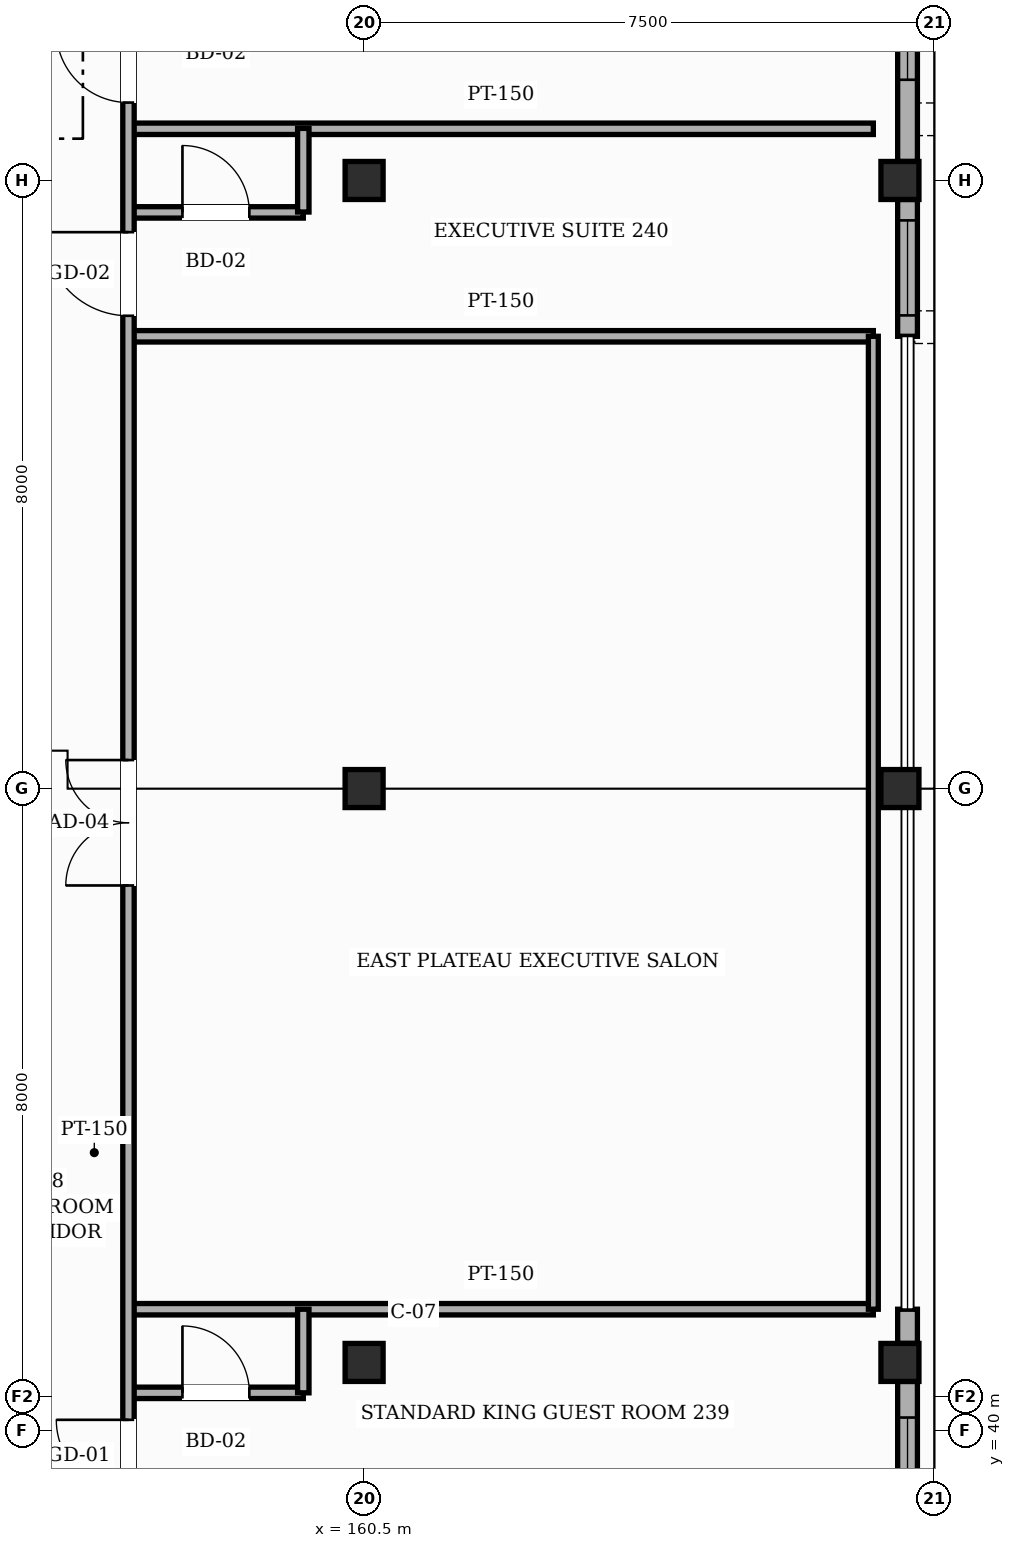
"""IFC4 building model, lengths in metres.
Left out: names, types, materials, properties, quantities, classifications, styles, units other than length and angle.
Written with IfcOpenShell. Run it as: python <this file> out.ifc"""

import sys

from ifc_helpers import new_model, si_unit, direction, frame, frame_2d, origin, origin_2d, place, context, subcontext, project, spatial, rectangle, hollow_rectangle, extrude, element, fill, save


model = new_model("IFC4")
c1 = context("Model", 3, precision=1e-05, world=origin(), true_north=direction((0.0, 1.0)))
c2 = subcontext(c1, "Body", "Model", "MODEL_VIEW")
j1 = project(units=[si_unit("LENGTHUNIT", "METRE"), si_unit("PLANEANGLEUNIT", "RADIAN")], contexts=[c1])
p1 = place(None, origin())
s1 = spatial("IfcSite", under=j1, at=p1, CompositionType="ELEMENT")
p2 = place(p1, origin())
s2 = spatial("IfcBuilding", under=s1, at=p2, CompositionType="ELEMENT")
p3 = place(p2, frame((0.0, 0.0, 35.4)))
s3 = spatial("IfcBuildingStorey", under=s2, at=p3, CompositionType="ELEMENT", Elevation=35.4)
for number, where, z_axis, x_axis in (
    (1, (160.5, 40.9, 0.0), (0.0, 0.0, 1.0), (1.0, 0.0, 0.0)),
    (2, (160.5, 48.45, 0.0), (0.0, 0.0, 1.0), (1.0, 0.0, 0.0)),
    (3, (160.5, 56.45, 0.0), (0.0, 0.0, 1.0), (1.0, 0.0, 0.0)),
    (4, (167.55, 40.9, 0.0), (0.0, 0.0, 1.0), (1.0, 0.0, 0.0)),
    (5, (167.55, 48.45, 0.0), (0.0, 0.0, 1.0), (1.0, 0.0, 0.0)),
    (6, (167.55, 56.45, 0.0), (0.0, 0.0, 1.0), (1.0, 0.0, 0.0)),
):
    element("IfcColumn", number, at=place(p3, frame(where, z_axis=z_axis, x_axis=x_axis)), inside=s3, PredefinedType="COLUMN", context=c2, shape_type="SweptSolid", body=[
        extrude(hollow_rectangle(XDim=0.5, YDim=0.5, WallThickness=0.022, InnerFilletRadius=0.022, OuterFilletRadius=0.044, at=origin_2d()), origin(), (0.0, 0.0, 1.0), 3.6),
    ])
p4 = place(p3, frame((167.65, 40.65, 0.0), z_axis=(0.0, 0.0, 1.0), x_axis=(0.0, -1.0, 0.0)))
e7 = element("IfcWall", 7, at=p4, inside=s3, PredefinedType="SOLIDWALL", context=c2, shape_type="SweptSolid", body=[
    extrude(rectangle(XDim=8.4, YDim=0.26, at=frame_2d((4.2, 0.0))), origin(), (0.0, 0.0, 1.0), 2.755),
])
p5 = place(p4, frame((5.07, 0.0, 0.85)))
e8 = element("IfcOpeningElement", 8, at=p5, cuts=e7, PredefinedType="OPENING", context=c2, shape_type="SweptSolid", body=[
    extrude(rectangle(XDim=1.75, YDim=1.35, at=frame_2d((0.875, 0.675))), frame((0.0, 0.14, 0.0), z_axis=(0.0, -1.0, 0.0), x_axis=(1.0, 0.0, 0.0)), (0.0, 0.0, 1.0), 0.28),
])
p6 = place(p4, frame((2.21, 0.0, 0.85)))
e9 = element("IfcOpeningElement", 9, at=p6, cuts=e7, PredefinedType="OPENING", context=c2, shape_type="SweptSolid", body=[
    extrude(rectangle(XDim=1.95, YDim=1.35, at=frame_2d((0.975, 0.675))), frame((0.0, 0.14, 0.0), z_axis=(0.0, -1.0, 0.0), x_axis=(1.0, 0.0, 0.0)), (0.0, 0.0, 1.0), 0.28),
])
p7 = place(p4, frame((0.475, 0.0, 0.85)))
e10 = element("IfcOpeningElement", 10, at=p7, cuts=e7, PredefinedType="OPENING", context=c2, shape_type="SweptSolid", body=[
    extrude(rectangle(XDim=0.85, YDim=1.35, at=frame_2d((0.425, 0.675))), frame((0.0, 0.14, 0.0), z_axis=(0.0, -1.0, 0.0), x_axis=(1.0, 0.0, 0.0)), (0.0, 0.0, 1.0), 0.28),
])
p8 = place(p3, frame((167.65, 41.6, 0.0), z_axis=(0.0, 0.0, 1.0), x_axis=(0.0, -1.0, 0.0)))
e11 = element("IfcWall", 11, at=p8, inside=s3, PredefinedType="SOLIDWALL", context=c2, shape_type="SweptSolid", body=[
    extrude(rectangle(XDim=0.45, YDim=0.26, at=frame_2d((0.225, 0.0))), origin(), (0.0, 0.0, 1.0), 2.755),
])
p9 = place(p3, frame((167.65, 56.2, 0.0), z_axis=(0.0, 0.0, 1.0), x_axis=(0.0, -1.0, 0.0)))
e12 = element("IfcWall", 12, at=p9, inside=s3, PredefinedType="SOLIDWALL", context=c2, shape_type="SweptSolid", body=[
    extrude(rectangle(XDim=1.8, YDim=0.26, at=frame_2d((0.9, 0.0))), origin(), (0.0, 0.0, 1.0), 2.755),
])
p10 = place(p9, frame((0.275, 0.0, 0.85)))
e13 = element("IfcOpeningElement", 13, at=p10, cuts=e12, PredefinedType="OPENING", context=c2, shape_type="SweptSolid", body=[
    extrude(rectangle(XDim=1.25, YDim=1.35, at=frame_2d((0.625, 0.675))), frame((0.0, 0.14, 0.0), z_axis=(0.0, -1.0, 0.0), x_axis=(1.0, 0.0, 0.0)), (0.0, 0.0, 1.0), 0.28),
])
p11 = place(p3, frame((167.65, 64.2, 0.0), z_axis=(0.0, 0.0, 1.0), x_axis=(0.0, -1.0, 0.0)))
e14 = element("IfcWall", 14, at=p11, inside=s3, PredefinedType="SOLIDWALL", context=c2, shape_type="SweptSolid", body=[
    extrude(rectangle(XDim=7.5, YDim=0.26, at=frame_2d((3.75, 0.0))), origin(), (0.0, 0.0, 1.0), 2.755),
])
p12 = place(p11, frame((4.975, 0.0, 0.85)))
e15 = element("IfcOpeningElement", 15, at=p12, cuts=e14, PredefinedType="OPENING", context=c2, shape_type="SweptSolid", body=[
    extrude(rectangle(XDim=1.45, YDim=1.35, at=frame_2d((0.725, 0.675))), frame((0.0, 0.14, 0.0), z_axis=(0.0, -1.0, 0.0), x_axis=(1.0, 0.0, 0.0)), (0.0, 0.0, 1.0), 0.28),
])
p13 = place(p11, frame((2.145, 0.0, 0.85)))
e16 = element("IfcOpeningElement", 16, at=p13, cuts=e14, PredefinedType="OPENING", context=c2, shape_type="SweptSolid", body=[
    extrude(rectangle(XDim=1.65, YDim=1.35, at=frame_2d((0.825, 0.675))), frame((0.0, 0.14, 0.0), z_axis=(0.0, -1.0, 0.0), x_axis=(1.0, 0.0, 0.0)), (0.0, 0.0, 1.0), 0.28),
])
p14 = place(p11, frame((0.375, 0.0, 0.85)))
e17 = element("IfcOpeningElement", 17, at=p14, cuts=e14, PredefinedType="OPENING", context=c2, shape_type="SweptSolid", body=[
    extrude(rectangle(XDim=0.85, YDim=1.35, at=frame_2d((0.425, 0.675))), frame((0.0, 0.14, 0.0), z_axis=(0.0, -1.0, 0.0), x_axis=(1.0, 0.0, 0.0)), (0.0, 0.0, 1.0), 0.28),
])
p15 = place(p3, frame((157.4, 40.5, 0.0), z_axis=(0.0, 0.0, 1.0), x_axis=(1.0, 0.0, 0.0)))
e18 = element("IfcWall", 18, at=p15, inside=s3, PredefinedType="PARTITIONING", context=c2, shape_type="SweptSolid", body=[
    extrude(rectangle(XDim=2.3, YDim=0.15, at=frame_2d((1.15, 0.0))), origin(), (0.0, 0.0, 1.0), 3.365),
])
p16 = place(p15, frame((0.71, 0.0, 0.0)))
e19 = element("IfcOpeningElement", 19, at=p16, cuts=e18, PredefinedType="OPENING", context=c2, shape_type="SweptSolid", body=[
    extrude(rectangle(XDim=0.88, YDim=2.12, at=frame_2d((0.44, 1.06))), frame((0.0, 0.085, 0.0), z_axis=(0.0, -1.0, 0.0), x_axis=(1.0, 0.0, 0.0)), (0.0, 0.0, 1.0), 0.17),
])
for number, where, z_axis, x_axis in (
    (20, (157.4, 41.6, 0.0), (0.0, 0.0, 1.0), (1.0, 0.0, 0.0)),
    (21, (157.4, 54.4, 0.0), (0.0, 0.0, 1.0), (1.0, 0.0, 0.0)),
):
    element("IfcWall", number, at=place(p3, frame(where, z_axis=z_axis, x_axis=x_axis)), inside=s3, PredefinedType="PARTITIONING", context=c2, shape_type="SweptSolid", body=[
        extrude(rectangle(XDim=9.8, YDim=0.15, at=frame_2d((4.9, 0.0))), origin(), (0.0, 0.0, 1.0), 3.365),
    ])
p17 = place(p3, frame((157.4, 56.03, 0.0), z_axis=(0.0, 0.0, 1.0), x_axis=(1.0, 0.0, 0.0)))
e22 = element("IfcWall", 22, at=p17, inside=s3, PredefinedType="PARTITIONING", context=c2, shape_type="SweptSolid", body=[
    extrude(rectangle(XDim=2.3, YDim=0.15, at=frame_2d((1.15, 0.0))), origin(), (0.0, 0.0, 1.0), 3.365),
])
p18 = place(p17, frame((0.71, 0.0, 0.0)))
e23 = element("IfcOpeningElement", 23, at=p18, cuts=e22, PredefinedType="OPENING", context=c2, shape_type="SweptSolid", body=[
    extrude(rectangle(XDim=0.88, YDim=2.12, at=frame_2d((0.44, 1.06))), frame((0.0, 0.085, 0.0), z_axis=(0.0, -1.0, 0.0), x_axis=(1.0, 0.0, 0.0)), (0.0, 0.0, 1.0), 0.17),
])
p19 = place(p3, frame((157.4, 57.13, 0.0), z_axis=(0.0, 0.0, 1.0), x_axis=(1.0, 0.0, 0.0)))
e24 = element("IfcWall", 24, at=p19, inside=s3, PredefinedType="PARTITIONING", context=c2, shape_type="SweptSolid", body=[
    extrude(rectangle(XDim=9.8, YDim=0.15, at=frame_2d((4.9, 0.0))), origin(), (0.0, 0.0, 1.0), 3.365),
])
p20 = place(p3, frame((157.4, 22.3, 0.0), z_axis=(0.0, 0.0, 1.0), x_axis=(0.0, 1.0, 0.0)))
e25 = element("IfcWall", 25, at=p20, inside=s3, PredefinedType="PARTITIONING", context=c2, shape_type="SweptSolid", body=[
    extrude(rectangle(XDim=48.5, YDim=0.15, at=frame_2d((24.25, 0.0))), origin(), (0.0, 0.0, 1.0), 3.365),
])
p21 = place(p20, frame((24.875, 0.0, 0.0)))
e26 = element("IfcOpeningElement", 26, at=p21, cuts=e25, PredefinedType="OPENING", context=c2, shape_type="SweptSolid", body=[
    extrude(rectangle(XDim=1.65, YDim=2.35, at=frame_2d((0.825, 1.175))), frame((0.0, 0.085, 0.0), z_axis=(0.0, -1.0, 0.0), x_axis=(1.0, 0.0, 0.0)), (0.0, 0.0, 1.0), 0.17),
])
p22 = place(p20, frame((0.275, 0.0, 0.0)))
e27 = element("IfcOpeningElement", 27, at=p22, cuts=e25, PredefinedType="OPENING", context=c2, shape_type="SweptSolid", body=[
    extrude(rectangle(XDim=1.1, YDim=2.2, at=frame_2d((0.55, 1.1))), frame((0.0, 0.085, 0.0), z_axis=(0.0, -1.0, 0.0), x_axis=(1.0, 0.0, 0.0)), (0.0, 0.0, 1.0), 0.17),
])
p23 = place(p20, frame((3.11, 0.0, 0.0)))
e28 = element("IfcOpeningElement", 28, at=p23, cuts=e25, PredefinedType="OPENING", context=c2, shape_type="SweptSolid", body=[
    extrude(rectangle(XDim=0.95, YDim=2.15, at=frame_2d((0.475, 1.075))), frame((0.0, 0.085, 0.0), z_axis=(0.0, -1.0, 0.0), x_axis=(1.0, 0.0, 0.0)), (0.0, 0.0, 1.0), 0.17),
])
p24 = place(p20, frame((5.865, 0.0, 0.0)))
e29 = element("IfcOpeningElement", 29, at=p24, cuts=e25, PredefinedType="OPENING", context=c2, shape_type="SweptSolid", body=[
    extrude(rectangle(XDim=0.95, YDim=2.15, at=frame_2d((0.475, 1.075))), frame((0.0, 0.085, 0.0), z_axis=(0.0, -1.0, 0.0), x_axis=(1.0, 0.0, 0.0)), (0.0, 0.0, 1.0), 0.17),
])
p25 = place(p20, frame((8.625, 0.0, 0.0)))
e30 = element("IfcOpeningElement", 30, at=p25, cuts=e25, PredefinedType="OPENING", context=c2, shape_type="SweptSolid", body=[
    extrude(rectangle(XDim=0.95, YDim=2.15, at=frame_2d((0.475, 1.075))), frame((0.0, 0.085, 0.0), z_axis=(0.0, -1.0, 0.0), x_axis=(1.0, 0.0, 0.0)), (0.0, 0.0, 1.0), 0.17),
])
p26 = place(p20, frame((11.38, 0.0, 0.0)))
e31 = element("IfcOpeningElement", 31, at=p26, cuts=e25, PredefinedType="OPENING", context=c2, shape_type="SweptSolid", body=[
    extrude(rectangle(XDim=0.95, YDim=2.15, at=frame_2d((0.475, 1.075))), frame((0.0, 0.085, 0.0), z_axis=(0.0, -1.0, 0.0), x_axis=(1.0, 0.0, 0.0)), (0.0, 0.0, 1.0), 0.17),
])
p27 = place(p20, frame((14.14, 0.0, 0.0)))
e32 = element("IfcOpeningElement", 32, at=p27, cuts=e25, PredefinedType="OPENING", context=c2, shape_type="SweptSolid", body=[
    extrude(rectangle(XDim=0.95, YDim=2.15, at=frame_2d((0.475, 1.075))), frame((0.0, 0.085, 0.0), z_axis=(0.0, -1.0, 0.0), x_axis=(1.0, 0.0, 0.0)), (0.0, 0.0, 1.0), 0.17),
])
p28 = place(p20, frame((16.895, 0.0, 0.0)))
e33 = element("IfcOpeningElement", 33, at=p28, cuts=e25, PredefinedType="OPENING", context=c2, shape_type="SweptSolid", body=[
    extrude(rectangle(XDim=0.95, YDim=2.15, at=frame_2d((0.475, 1.075))), frame((0.0, 0.085, 0.0), z_axis=(0.0, -1.0, 0.0), x_axis=(1.0, 0.0, 0.0)), (0.0, 0.0, 1.0), 0.17),
])
p29 = place(p20, frame((32.37, 0.0, 0.0)))
e34 = element("IfcOpeningElement", 34, at=p29, cuts=e25, PredefinedType="OPENING", context=c2, shape_type="SweptSolid", body=[
    extrude(rectangle(XDim=1.1, YDim=2.2, at=frame_2d((0.55, 1.1))), frame((0.0, 0.085, 0.0), z_axis=(0.0, -1.0, 0.0), x_axis=(1.0, 0.0, 0.0)), (0.0, 0.0, 1.0), 0.17),
])
p30 = place(p20, frame((35.175, 0.0, 0.0)))
e35 = element("IfcOpeningElement", 35, at=p30, cuts=e25, PredefinedType="OPENING", context=c2, shape_type="SweptSolid", body=[
    extrude(rectangle(XDim=0.95, YDim=2.15, at=frame_2d((0.475, 1.075))), frame((0.0, 0.085, 0.0), z_axis=(0.0, -1.0, 0.0), x_axis=(1.0, 0.0, 0.0)), (0.0, 0.0, 1.0), 0.17),
])
p31 = place(p20, frame((37.91, 0.0, 0.0)))
e36 = element("IfcOpeningElement", 36, at=p31, cuts=e25, PredefinedType="OPENING", context=c2, shape_type="SweptSolid", body=[
    extrude(rectangle(XDim=0.95, YDim=2.15, at=frame_2d((0.475, 1.075))), frame((0.0, 0.085, 0.0), z_axis=(0.0, -1.0, 0.0), x_axis=(1.0, 0.0, 0.0)), (0.0, 0.0, 1.0), 0.17),
])
p32 = place(p20, frame((40.64, 0.0, 0.0)))
e37 = element("IfcOpeningElement", 37, at=p32, cuts=e25, PredefinedType="OPENING", context=c2, shape_type="SweptSolid", body=[
    extrude(rectangle(XDim=0.95, YDim=2.15, at=frame_2d((0.475, 1.075))), frame((0.0, 0.085, 0.0), z_axis=(0.0, -1.0, 0.0), x_axis=(1.0, 0.0, 0.0)), (0.0, 0.0, 1.0), 0.17),
])
p33 = place(p20, frame((43.375, 0.0, 0.0)))
e38 = element("IfcOpeningElement", 38, at=p33, cuts=e25, PredefinedType="OPENING", context=c2, shape_type="SweptSolid", body=[
    extrude(rectangle(XDim=0.95, YDim=2.15, at=frame_2d((0.475, 1.075))), frame((0.0, 0.085, 0.0), z_axis=(0.0, -1.0, 0.0), x_axis=(1.0, 0.0, 0.0)), (0.0, 0.0, 1.0), 0.17),
])
p34 = place(p20, frame((46.11, 0.0, 0.0)))
e39 = element("IfcOpeningElement", 39, at=p34, cuts=e25, PredefinedType="OPENING", context=c2, shape_type="SweptSolid", body=[
    extrude(rectangle(XDim=0.95, YDim=2.15, at=frame_2d((0.475, 1.075))), frame((0.0, 0.085, 0.0), z_axis=(0.0, -1.0, 0.0), x_axis=(1.0, 0.0, 0.0)), (0.0, 0.0, 1.0), 0.17),
])
for number, where, z_axis, x_axis in (
    (40, (159.7, 40.5, 0.0), (0.0, 0.0, 1.0), (0.0, 1.0, 0.0)),
    (41, (159.7, 56.035, 0.0), (0.0, 0.0, 1.0), (0.0, 1.0, 0.0)),
):
    element("IfcWall", number, at=place(p3, frame(where, z_axis=z_axis, x_axis=x_axis)), inside=s3, PredefinedType="PARTITIONING", context=c2, shape_type="SweptSolid", body=[
        extrude(rectangle(XDim=1.1, YDim=0.15, at=frame_2d((0.55, 0.0))), origin(), (0.0, 0.0, 1.0), 3.365),
    ])
p35 = place(p3, frame((167.2, 41.6, 0.0), z_axis=(0.0, 0.0, 1.0), x_axis=(0.0, 1.0, 0.0)))
e42 = element("IfcWall", 42, at=p35, inside=s3, PredefinedType="PARTITIONING", context=c2, shape_type="SweptSolid", body=[
    extrude(rectangle(XDim=12.8, YDim=0.13, at=frame_2d((6.4, 0.0))), origin(), (0.0, 0.0, 1.0), 3.365),
])
p36 = place(p7, origin())
e43 = element("IfcWindow", 43, at=p36, inside=s3, PartitioningType="SINGLE_PANEL", PredefinedType="WINDOW", context=c2, shape_type="SweptSolid", body=[
    extrude(rectangle(XDim=0.85, YDim=1.35, at=frame_2d((0.425, 0.675))), frame((0.0, 0.03, 0.0), z_axis=(0.0, -1.0, 0.0), x_axis=(1.0, 0.0, 0.0)), (0.0, 0.0, 1.0), 0.06),
])
fill(e10, e43)
p37 = place(p10, origin())
e44 = element("IfcWindow", 44, at=p37, inside=s3, PartitioningType="SINGLE_PANEL", PredefinedType="WINDOW", context=c2, shape_type="SweptSolid", body=[
    extrude(rectangle(XDim=1.25, YDim=1.35, at=frame_2d((0.625, 0.675))), frame((0.0, 0.03, 0.0), z_axis=(0.0, -1.0, 0.0), x_axis=(1.0, 0.0, 0.0)), (0.0, 0.0, 1.0), 0.06),
])
fill(e13, e44)
p38 = place(p12, origin())
e45 = element("IfcWindow", 45, at=p38, inside=s3, PartitioningType="SINGLE_PANEL", PredefinedType="WINDOW", context=c2, shape_type="SweptSolid", body=[
    extrude(rectangle(XDim=1.45, YDim=1.35, at=frame_2d((0.725, 0.675))), frame((0.0, 0.03, 0.0), z_axis=(0.0, -1.0, 0.0), x_axis=(1.0, 0.0, 0.0)), (0.0, 0.0, 1.0), 0.06),
])
fill(e15, e45)
p39 = place(p21, origin())
e46 = element("IfcDoor", 46, at=p39, inside=s3, OperationType="DOUBLE_DOOR_SINGLE_SWING", PredefinedType="DOOR", context=c2, shape_type="SweptSolid", body=[
    extrude(rectangle(XDim=1.65, YDim=2.35, at=frame_2d((0.825, 1.175))), frame((0.0, 0.025, 0.0), z_axis=(0.0, -1.0, 0.0), x_axis=(1.0, 0.0, 0.0)), (0.0, 0.0, 1.0), 0.05),
])
fill(e26, e46)
p40 = place(p28, origin())
e47 = element("IfcDoor", 47, at=p40, inside=s3, OperationType="SINGLE_SWING_RIGHT", PredefinedType="DOOR", context=c2, shape_type="SweptSolid", body=[
    extrude(rectangle(XDim=0.95, YDim=2.15, at=frame_2d((0.475, 1.075))), frame((0.0, 0.025, 0.0), z_axis=(0.0, -1.0, 0.0), x_axis=(1.0, 0.0, 0.0)), (0.0, 0.0, 1.0), 0.05),
])
fill(e33, e47)
p41 = place(p16, origin())
e48 = element("IfcDoor", 48, at=p41, inside=s3, OperationType="SINGLE_SWING_LEFT", PredefinedType="DOOR", context=c2, shape_type="SweptSolid", body=[
    extrude(rectangle(XDim=0.88, YDim=2.12, at=frame_2d((0.44, 1.06))), frame((0.0, 0.025, 0.0), z_axis=(0.0, -1.0, 0.0), x_axis=(1.0, 0.0, 0.0)), (0.0, 0.0, 1.0), 0.05),
])
fill(e19, e48)
p42 = place(p29, origin())
e49 = element("IfcDoor", 49, at=p42, inside=s3, OperationType="SINGLE_SWING_RIGHT", PredefinedType="DOOR", context=c2, shape_type="SweptSolid", body=[
    extrude(rectangle(XDim=1.1, YDim=2.2, at=frame_2d((0.55, 1.1))), frame((0.0, 0.025, 0.0), z_axis=(0.0, -1.0, 0.0), x_axis=(1.0, 0.0, 0.0)), (0.0, 0.0, 1.0), 0.05),
])
fill(e34, e49)
p43 = place(p18, origin())
e50 = element("IfcDoor", 50, at=p43, inside=s3, OperationType="SINGLE_SWING_LEFT", PredefinedType="DOOR", context=c2, shape_type="SweptSolid", body=[
    extrude(rectangle(XDim=0.88, YDim=2.12, at=frame_2d((0.44, 1.06))), frame((0.0, 0.025, 0.0), z_axis=(0.0, -1.0, 0.0), x_axis=(1.0, 0.0, 0.0)), (0.0, 0.0, 1.0), 0.05),
])
fill(e23, e50)
p44 = place(p30, origin())
e51 = element("IfcDoor", 51, at=p44, inside=s3, OperationType="SINGLE_SWING_RIGHT", PredefinedType="DOOR", context=c2, shape_type="SweptSolid", body=[
    extrude(rectangle(XDim=0.95, YDim=2.15, at=frame_2d((0.475, 1.075))), frame((0.0, 0.025, 0.0), z_axis=(0.0, -1.0, 0.0), x_axis=(1.0, 0.0, 0.0)), (0.0, 0.0, 1.0), 0.05),
])
fill(e35, e51)
save(model, sys.argv[1])
